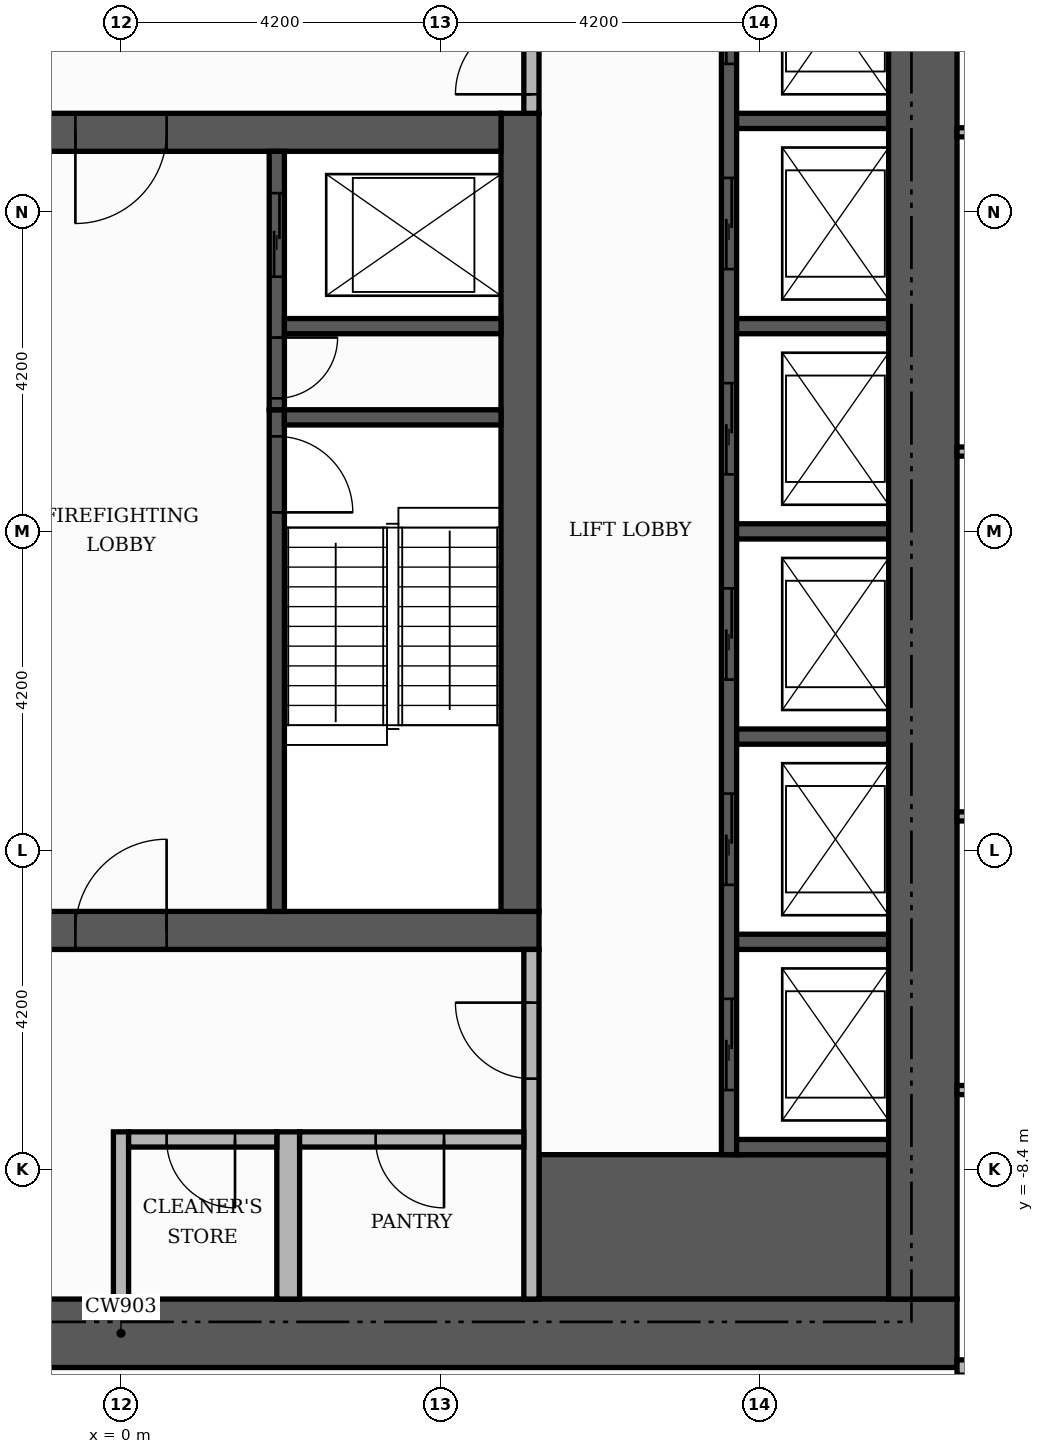
"""IFC4 building model, lengths in metres.
Left out: names, types, materials, properties, quantities, classifications, styles, units other than length and angle.
Written with IfcOpenShell. Run it as: python <this file> out.ifc"""

import sys

from ifc_helpers import new_model, si_unit, direction, frame, frame_2d, origin, place, context, subcontext, project, spatial, rectangle, extrude, element, fill, save


model = new_model("IFC4")
c1 = context("Model", 3, precision=1e-05, world=origin(), true_north=direction((0.0, 1.0)))
c2 = subcontext(c1, "Body", "Model", "MODEL_VIEW")
j1 = project(units=[si_unit("LENGTHUNIT", "METRE"), si_unit("PLANEANGLEUNIT", "RADIAN")], contexts=[c1])
p1 = place(None, origin())
s1 = spatial("IfcSite", under=j1, at=p1, CompositionType="ELEMENT")
p2 = place(p1, origin())
s2 = spatial("IfcBuilding", under=s1, at=p2, CompositionType="ELEMENT")
p3 = place(p2, frame((0.0, 0.0, 153.3)))
s3 = spatial("IfcBuildingStorey", under=s2, at=p3, CompositionType="ELEMENT", Elevation=153.3)
p4 = place(p3, frame((-5.5, -5.25, 0.0), z_axis=(0.0, 0.0, 1.0), x_axis=(1.0, 0.0, 0.0)))
e1 = element("IfcWall", 1, at=p4, inside=s3, PredefinedType="SHEAR", context=c2, shape_type="SweptSolid", body=[
    extrude(rectangle(XDim=11.0, YDim=0.5, at=frame_2d((5.5, 0.0))), origin(), (0.0, 0.0, 1.0), 3.48),
])
p5 = place(p4, frame((4.9, 0.0, 0.0)))
e2 = element("IfcOpeningElement", 2, at=p5, cuts=e1, PredefinedType="OPENING", context=c2, shape_type="SweptSolid", body=[
    extrude(rectangle(XDim=1.2, YDim=2.1, at=frame_2d((0.6, 1.05))), frame((0.0, 0.26, 0.0), z_axis=(0.0, -1.0, 0.0), x_axis=(1.0, 0.0, 0.0)), (0.0, 0.0, 1.0), 0.52),
])
p6 = place(p3, frame((5.25, -5.0, 0.0), z_axis=(0.0, 0.0, 1.0), x_axis=(0.0, 1.0, 0.0)))
e3 = element("IfcWall", 3, at=p6, inside=s3, PredefinedType="SHEAR", context=c2, shape_type="SweptSolid", body=[
    extrude(rectangle(XDim=10.5, YDim=0.5, at=frame_2d((5.25, 0.0))), origin(), (0.0, 0.0, 1.0), 3.48),
])
p7 = place(p3, frame((-5.0, 5.25, 0.0), z_axis=(0.0, 0.0, 1.0), x_axis=(1.0, 0.0, 0.0)))
e4 = element("IfcWall", 4, at=p7, inside=s3, PredefinedType="SHEAR", context=c2, shape_type="SweptSolid", body=[
    extrude(rectangle(XDim=10.0, YDim=0.5, at=frame_2d((5.0, 0.0))), origin(), (0.0, 0.0, 1.0), 3.48),
])
p8 = place(p7, frame((4.4, 0.0, 0.0)))
e5 = element("IfcOpeningElement", 5, at=p8, cuts=e4, PredefinedType="OPENING", context=c2, shape_type="SweptSolid", body=[
    extrude(rectangle(XDim=1.2, YDim=2.1, at=frame_2d((0.6, 1.05))), frame((0.0, 0.26, 0.0), z_axis=(0.0, -1.0, 0.0), x_axis=(1.0, 0.0, 0.0)), (0.0, 0.0, 1.0), 0.52),
])
p9 = place(p3, frame((5.5, -9.15, 0.0), z_axis=(0.0, 0.0, 1.0), x_axis=(1.0, 0.0, 0.0)))
e6 = element("IfcWall", 6, at=p9, inside=s3, PredefinedType="SHEAR", context=c2, shape_type="SweptSolid", body=[
    extrude(rectangle(XDim=4.6, YDim=1.9, at=frame_2d((2.3, 0.0))), origin(), (0.0, 0.0, 1.0), 3.48),
])
p10 = place(p3, frame((2.05, -5.0, 0.0), z_axis=(0.0, 0.0, 1.0), x_axis=(0.0, 1.0, 0.0)))
e7 = element("IfcWall", 7, at=p10, inside=s3, PredefinedType="SHEAR", context=c2, shape_type="SweptSolid", body=[
    extrude(rectangle(XDim=6.6, YDim=0.2, at=frame_2d((3.3, 0.0))), origin(), (0.0, 0.0, 1.0), 3.48),
])
p11 = place(p10, frame((5.25, 0.0, 0.0)))
e8 = element("IfcOpeningElement", 8, at=p11, cuts=e7, PredefinedType="OPENING", context=c2, shape_type="SweptSolid", body=[
    extrude(rectangle(XDim=1.0, YDim=2.1, at=frame_2d((0.5, 1.05))), frame((0.0, 0.11, 0.0), z_axis=(0.0, -1.0, 0.0), x_axis=(1.0, 0.0, 0.0)), (0.0, 0.0, 1.0), 0.22),
])
p12 = place(p3, frame((2.15, 1.5, 0.0), z_axis=(0.0, 0.0, 1.0), x_axis=(1.0, 0.0, 0.0)))
e9 = element("IfcWall", 9, at=p12, inside=s3, PredefinedType="SHEAR", context=c2, shape_type="SweptSolid", body=[
    extrude(rectangle(XDim=2.85, YDim=0.2, at=frame_2d((1.425, 0.0))), origin(), (0.0, 0.0, 1.0), 3.48),
])
p13 = place(p3, frame((8.0, -8.2, 0.0), z_axis=(0.0, 0.0, 1.0), x_axis=(0.0, 1.0, 0.0)))
e10 = element("IfcWall", 10, at=p13, inside=s3, PredefinedType="SHEAR", context=c2, shape_type="SweptSolid", body=[
    extrude(rectangle(XDim=16.4, YDim=0.2, at=frame_2d((8.2, 0.0))), origin(), (0.0, 0.0, 1.0), 3.48),
])
p14 = place(p13, frame((0.85, 0.0, 0.0)))
e11 = element("IfcOpeningElement", 11, at=p14, cuts=e10, PredefinedType="OPENING", context=c2, shape_type="SweptSolid", body=[
    extrude(rectangle(XDim=1.2, YDim=2.1, at=frame_2d((0.6, 1.05))), frame((0.0, 0.11, 0.0), z_axis=(0.0, -1.0, 0.0), x_axis=(1.0, 0.0, 0.0)), (0.0, 0.0, 1.0), 0.22),
])
p15 = place(p13, frame((3.55, 0.0, 0.0)))
e12 = element("IfcOpeningElement", 12, at=p15, cuts=e10, PredefinedType="OPENING", context=c2, shape_type="SweptSolid", body=[
    extrude(rectangle(XDim=1.2, YDim=2.1, at=frame_2d((0.6, 1.05))), frame((0.0, 0.11, 0.0), z_axis=(0.0, -1.0, 0.0), x_axis=(1.0, 0.0, 0.0)), (0.0, 0.0, 1.0), 0.22),
])
p16 = place(p13, frame((6.25, 0.0, 0.0)))
e13 = element("IfcOpeningElement", 13, at=p16, cuts=e10, PredefinedType="OPENING", context=c2, shape_type="SweptSolid", body=[
    extrude(rectangle(XDim=1.2, YDim=2.1, at=frame_2d((0.6, 1.05))), frame((0.0, 0.11, 0.0), z_axis=(0.0, -1.0, 0.0), x_axis=(1.0, 0.0, 0.0)), (0.0, 0.0, 1.0), 0.22),
])
p17 = place(p13, frame((8.95, 0.0, 0.0)))
e14 = element("IfcOpeningElement", 14, at=p17, cuts=e10, PredefinedType="OPENING", context=c2, shape_type="SweptSolid", body=[
    extrude(rectangle(XDim=1.2, YDim=2.1, at=frame_2d((0.6, 1.05))), frame((0.0, 0.11, 0.0), z_axis=(0.0, -1.0, 0.0), x_axis=(1.0, 0.0, 0.0)), (0.0, 0.0, 1.0), 0.22),
])
p18 = place(p13, frame((11.65, 0.0, 0.0)))
e15 = element("IfcOpeningElement", 15, at=p18, cuts=e10, PredefinedType="OPENING", context=c2, shape_type="SweptSolid", body=[
    extrude(rectangle(XDim=1.2, YDim=2.1, at=frame_2d((0.6, 1.05))), frame((0.0, 0.11, 0.0), z_axis=(0.0, -1.0, 0.0), x_axis=(1.0, 0.0, 0.0)), (0.0, 0.0, 1.0), 0.22),
])
p19 = place(p13, frame((14.35, 0.0, 0.0)))
e16 = element("IfcOpeningElement", 16, at=p19, cuts=e10, PredefinedType="OPENING", context=c2, shape_type="SweptSolid", body=[
    extrude(rectangle(XDim=1.2, YDim=2.1, at=frame_2d((0.6, 1.05))), frame((0.0, 0.11, 0.0), z_axis=(0.0, -1.0, 0.0), x_axis=(1.0, 0.0, 0.0)), (0.0, 0.0, 1.0), 0.22),
])
for number, where, z_axis, x_axis in (
    (17, (8.1, -8.1, 0.0), (0.0, 0.0, 1.0), (1.0, 0.0, 0.0)),
    (18, (8.1, -5.4, 0.0), (0.0, 0.0, 1.0), (1.0, 0.0, 0.0)),
    (19, (8.1, -2.7, 0.0), (0.0, 0.0, 1.0), (1.0, 0.0, 0.0)),
    (20, (8.1, 0.0, 0.0), (0.0, 0.0, 1.0), (1.0, 0.0, 0.0)),
):
    element("IfcWall", number, at=place(p3, frame(where, z_axis=z_axis, x_axis=x_axis)), inside=s3, PredefinedType="SHEAR", context=c2, shape_type="SweptSolid", body=[
        extrude(rectangle(XDim=2.0, YDim=0.2, at=frame_2d((1.0, 0.0))), origin(), (0.0, 0.0, 1.0), 3.48),
    ])
p20 = place(p3, frame((2.05, 1.6, 0.0), z_axis=(0.0, 0.0, 1.0), x_axis=(0.0, 1.0, 0.0)))
e21 = element("IfcWall", 21, at=p20, inside=s3, PredefinedType="SHEAR", context=c2, shape_type="SweptSolid", body=[
    extrude(rectangle(XDim=3.4, YDim=0.2, at=frame_2d((1.7, 0.0))), origin(), (0.0, 0.0, 1.0), 3.48),
])
p21 = place(p20, frame((1.75, 0.0, 0.0)))
e22 = element("IfcOpeningElement", 22, at=p21, cuts=e21, PredefinedType="OPENING", context=c2, shape_type="SweptSolid", body=[
    extrude(rectangle(XDim=1.1, YDim=2.1, at=frame_2d((0.55, 1.05))), frame((0.0, 0.11, 0.0), z_axis=(0.0, -1.0, 0.0), x_axis=(1.0, 0.0, 0.0)), (0.0, 0.0, 1.0), 0.22),
])
p22 = place(p20, frame((0.15, 0.0, 0.0)))
e23 = element("IfcOpeningElement", 23, at=p22, cuts=e21, PredefinedType="OPENING", context=c2, shape_type="SweptSolid", body=[
    extrude(rectangle(XDim=0.8, YDim=2.1, at=frame_2d((0.4, 1.05))), frame((0.0, 0.11, 0.0), z_axis=(0.0, -1.0, 0.0), x_axis=(1.0, 0.0, 0.0)), (0.0, 0.0, 1.0), 0.22),
])
p23 = place(p3, frame((2.15, 2.7, 0.0), z_axis=(0.0, 0.0, 1.0), x_axis=(1.0, 0.0, 0.0)))
e24 = element("IfcWall", 24, at=p23, inside=s3, PredefinedType="SHEAR", context=c2, shape_type="SweptSolid", body=[
    extrude(rectangle(XDim=2.85, YDim=0.2, at=frame_2d((1.425, 0.0))), origin(), (0.0, 0.0, 1.0), 3.48),
])
for number, where, z_axis, x_axis in (
    (25, (8.1, 2.7, 0.0), (0.0, 0.0, 1.0), (1.0, 0.0, 0.0)),
    (26, (8.1, 5.4, 0.0), (0.0, 0.0, 1.0), (1.0, 0.0, 0.0)),
):
    element("IfcWall", number, at=place(p3, frame(where, z_axis=z_axis, x_axis=x_axis)), inside=s3, PredefinedType="SHEAR", context=c2, shape_type="SweptSolid", body=[
        extrude(rectangle(XDim=2.0, YDim=0.2, at=frame_2d((1.0, 0.0))), origin(), (0.0, 0.0, 1.0), 3.48),
    ])
p24 = place(p3, frame((-11.0, -10.55, 0.0), z_axis=(0.0, 0.0, 1.0), x_axis=(1.0, 0.0, 0.0)))
e27 = element("IfcWall", 27, at=p24, inside=s3, PredefinedType="SHEAR", context=c2, shape_type="SweptSolid", body=[
    extrude(rectangle(XDim=22.0, YDim=0.9, at=frame_2d((11.0, 0.0))), origin(), (0.0, 0.0, 1.0), 3.48),
])
p25 = place(p24, frame((7.4, 0.0, 0.0)))
e28 = element("IfcOpeningElement", 28, at=p25, cuts=e27, PredefinedType="OPENING", context=c2, shape_type="SweptSolid", body=[
    extrude(rectangle(XDim=1.8, YDim=2.2, at=frame_2d((0.9, 1.1))), frame((0.0, 0.46, 0.0), z_axis=(0.0, -1.0, 0.0), x_axis=(1.0, 0.0, 0.0)), (0.0, 0.0, 1.0), 0.92),
])
p26 = place(p3, frame((10.55, -10.1, 0.0), z_axis=(0.0, 0.0, 1.0), x_axis=(0.0, 1.0, 0.0)))
e29 = element("IfcWall", 29, at=p26, inside=s3, PredefinedType="SHEAR", context=c2, shape_type="SweptSolid", body=[
    extrude(rectangle(XDim=20.2, YDim=0.9, at=frame_2d((10.1, 0.0))), origin(), (0.0, 0.0, 1.0), 3.48),
])
p27 = place(p3, frame((0.0, -10.1, 0.0), z_axis=(0.0, 0.0, 1.0), x_axis=(0.0, 1.0, 0.0)))
e30 = element("IfcWall", 30, at=p27, inside=s3, PredefinedType="PARTITIONING", context=c2, shape_type="SweptSolid", body=[
    extrude(rectangle(XDim=2.2, YDim=0.2, at=frame_2d((1.1, 0.0))), origin(), (0.0, 0.0, 1.0), 3.48),
])
p28 = place(p3, frame((2.2, -10.1, 0.0), z_axis=(0.0, 0.0, 1.0), x_axis=(0.0, 1.0, 0.0)))
e31 = element("IfcWall", 31, at=p28, inside=s3, PredefinedType="PARTITIONING", context=c2, shape_type="SweptSolid", body=[
    extrude(rectangle(XDim=2.2, YDim=0.3, at=frame_2d((1.1, 0.0))), origin(), (0.0, 0.0, 1.0), 3.48),
])
p29 = place(p3, frame((5.4, -10.1, 0.0), z_axis=(0.0, 0.0, 1.0), x_axis=(0.0, 1.0, 0.0)))
e32 = element("IfcWall", 32, at=p29, inside=s3, PredefinedType="PARTITIONING", context=c2, shape_type="SweptSolid", body=[
    extrude(rectangle(XDim=4.6, YDim=0.2, at=frame_2d((2.3, 0.0))), origin(), (0.0, 0.0, 1.0), 3.48),
])
p30 = place(p29, frame((2.9, 0.0, 0.0)))
e33 = element("IfcOpeningElement", 33, at=p30, cuts=e32, PredefinedType="OPENING", context=c2, shape_type="SweptSolid", body=[
    extrude(rectangle(XDim=1.0, YDim=2.1, at=frame_2d((0.5, 1.05))), frame((0.0, 0.11, 0.0), z_axis=(0.0, -1.0, 0.0), x_axis=(1.0, 0.0, 0.0)), (0.0, 0.0, 1.0), 0.22),
])
p31 = place(p3, frame((0.1, -8.0, 0.0), z_axis=(0.0, 0.0, 1.0), x_axis=(1.0, 0.0, 0.0)))
e34 = element("IfcWall", 34, at=p31, inside=s3, PredefinedType="PARTITIONING", context=c2, shape_type="SweptSolid", body=[
    extrude(rectangle(XDim=1.95, YDim=0.2, at=frame_2d((0.975, 0.0))), origin(), (0.0, 0.0, 1.0), 3.48),
])
p32 = place(p31, frame((0.5, 0.0, 0.0)))
e35 = element("IfcOpeningElement", 35, at=p32, cuts=e34, PredefinedType="OPENING", context=c2, shape_type="SweptSolid", body=[
    extrude(rectangle(XDim=0.9, YDim=2.1, at=frame_2d((0.45, 1.05))), frame((0.0, 0.11, 0.0), z_axis=(0.0, -1.0, 0.0), x_axis=(1.0, 0.0, 0.0)), (0.0, 0.0, 1.0), 0.22),
])
p33 = place(p3, frame((2.35, -8.0, 0.0), z_axis=(0.0, 0.0, 1.0), x_axis=(1.0, 0.0, 0.0)))
e36 = element("IfcWall", 36, at=p33, inside=s3, PredefinedType="PARTITIONING", context=c2, shape_type="SweptSolid", body=[
    extrude(rectangle(XDim=2.95, YDim=0.2, at=frame_2d((1.475, 0.0))), origin(), (0.0, 0.0, 1.0), 3.48),
])
p34 = place(p33, frame((1.0, 0.0, 0.0)))
e37 = element("IfcOpeningElement", 37, at=p34, cuts=e36, PredefinedType="OPENING", context=c2, shape_type="SweptSolid", body=[
    extrude(rectangle(XDim=0.9, YDim=2.1, at=frame_2d((0.45, 1.05))), frame((0.0, 0.11, 0.0), z_axis=(0.0, -1.0, 0.0), x_axis=(1.0, 0.0, 0.0)), (0.0, 0.0, 1.0), 0.22),
])
p35 = place(p3, frame((5.4, 5.5, 0.0), z_axis=(0.0, 0.0, 1.0), x_axis=(0.0, 1.0, 0.0)))
e38 = element("IfcWall", 38, at=p35, inside=s3, PredefinedType="PARTITIONING", context=c2, shape_type="SweptSolid", body=[
    extrude(rectangle(XDim=4.6, YDim=0.2, at=frame_2d((2.3, 0.0))), origin(), (0.0, 0.0, 1.0), 3.48),
])
p36 = place(p35, frame((0.25, 0.0, 0.0)))
e39 = element("IfcOpeningElement", 39, at=p36, cuts=e38, PredefinedType="OPENING", context=c2, shape_type="SweptSolid", body=[
    extrude(rectangle(XDim=1.0, YDim=2.1, at=frame_2d((0.5, 1.05))), frame((0.0, 0.11, 0.0), z_axis=(0.0, -1.0, 0.0), x_axis=(1.0, 0.0, 0.0)), (0.0, 0.0, 1.0), 0.22),
])
p37 = place(p3, frame((11.0, -11.0, 0.0), z_axis=(0.0, 0.0, 1.0), x_axis=(1.0, 0.0, 0.0)))
e40 = element("IfcWall", 40, at=p37, inside=s3, PredefinedType="PARTITIONING", context=c2, shape_type="SweptSolid", body=[
    extrude(rectangle(XDim=2.65, YDim=0.2, at=frame_2d((1.325, 0.0))), origin(), (0.0, 0.0, 1.0), 3.48),
])
p38 = place(p37, frame((0.775, 0.0, 0.0)))
e41 = element("IfcOpeningElement", 41, at=p38, cuts=e40, PredefinedType="OPENING", context=c2, shape_type="SweptSolid", body=[
    extrude(rectangle(XDim=1.1, YDim=2.4, at=frame_2d((0.55, 1.2))), frame((0.0, 0.11, 0.0), z_axis=(0.0, -1.0, 0.0), x_axis=(1.0, 0.0, 0.0)), (0.0, 0.0, 1.0), 0.22),
])
p39 = place(p3, frame((11.0, -7.35, 0.0), z_axis=(0.0, 0.0, 1.0), x_axis=(1.0, 0.0, 0.0)))
e42 = element("IfcWall", 42, at=p39, inside=s3, PredefinedType="PARTITIONING", context=c2, shape_type="SweptSolid", body=[
    extrude(rectangle(XDim=7.32, YDim=0.12, at=frame_2d((3.66, 0.0))), origin(), (0.0, 0.0, 1.0), 3.48),
])
p40 = place(p39, frame((3.21, 0.0, 0.0)))
e43 = element("IfcOpeningElement", 43, at=p40, cuts=e42, PredefinedType="OPENING", context=c2, shape_type="SweptSolid", body=[
    extrude(rectangle(XDim=0.9, YDim=2.1, at=frame_2d((0.45, 1.05))), frame((0.0, 0.07, 0.0), z_axis=(0.0, -1.0, 0.0), x_axis=(1.0, 0.0, 0.0)), (0.0, 0.0, 1.0), 0.14),
])
for number, where, z_axis, x_axis in (
    (44, (11.0, -3.75, 0.0), (0.0, 0.0, 1.0), (1.0, 0.0, 0.0)),
    (45, (11.0, 1.05, 0.0), (0.0, 0.0, 1.0), (1.0, 0.0, 0.0)),
    (46, (11.0, 5.25, 0.0), (0.0, 0.0, 1.0), (1.0, 0.0, 0.0)),
):
    element("IfcWall", number, at=place(p3, frame(where, z_axis=z_axis, x_axis=x_axis)), inside=s3, PredefinedType="PARTITIONING", context=c2, shape_type="SweptSolid", body=[
        extrude(rectangle(XDim=7.32, YDim=0.12, at=frame_2d((3.66, 0.0))), origin(), (0.0, 0.0, 1.0), 3.48),
    ])
p41 = place(p14, origin())
e47 = element("IfcDoor", 47, at=p41, inside=s3, OperationType="SLIDING_TO_LEFT", PredefinedType="DOOR", context=c2, shape_type="SweptSolid", body=[
    extrude(rectangle(XDim=1.2, YDim=2.1, at=frame_2d((0.6, 1.05))), frame((0.0, 0.025, 0.0), z_axis=(0.0, -1.0, 0.0), x_axis=(1.0, 0.0, 0.0)), (0.0, 0.0, 1.0), 0.05),
])
fill(e11, e47)
p42 = place(p15, origin())
e48 = element("IfcDoor", 48, at=p42, inside=s3, OperationType="SLIDING_TO_LEFT", PredefinedType="DOOR", context=c2, shape_type="SweptSolid", body=[
    extrude(rectangle(XDim=1.2, YDim=2.1, at=frame_2d((0.6, 1.05))), frame((0.0, 0.025, 0.0), z_axis=(0.0, -1.0, 0.0), x_axis=(1.0, 0.0, 0.0)), (0.0, 0.0, 1.0), 0.05),
])
fill(e12, e48)
p43 = place(p16, origin())
e49 = element("IfcDoor", 49, at=p43, inside=s3, OperationType="SLIDING_TO_LEFT", PredefinedType="DOOR", context=c2, shape_type="SweptSolid", body=[
    extrude(rectangle(XDim=1.2, YDim=2.1, at=frame_2d((0.6, 1.05))), frame((0.0, 0.025, 0.0), z_axis=(0.0, -1.0, 0.0), x_axis=(1.0, 0.0, 0.0)), (0.0, 0.0, 1.0), 0.05),
])
fill(e13, e49)
p44 = place(p17, origin())
e50 = element("IfcDoor", 50, at=p44, inside=s3, OperationType="SLIDING_TO_LEFT", PredefinedType="DOOR", context=c2, shape_type="SweptSolid", body=[
    extrude(rectangle(XDim=1.2, YDim=2.1, at=frame_2d((0.6, 1.05))), frame((0.0, 0.025, 0.0), z_axis=(0.0, -1.0, 0.0), x_axis=(1.0, 0.0, 0.0)), (0.0, 0.0, 1.0), 0.05),
])
fill(e14, e50)
p45 = place(p18, origin())
e51 = element("IfcDoor", 51, at=p45, inside=s3, OperationType="SLIDING_TO_LEFT", PredefinedType="DOOR", context=c2, shape_type="SweptSolid", body=[
    extrude(rectangle(XDim=1.2, YDim=2.1, at=frame_2d((0.6, 1.05))), frame((0.0, 0.025, 0.0), z_axis=(0.0, -1.0, 0.0), x_axis=(1.0, 0.0, 0.0)), (0.0, 0.0, 1.0), 0.05),
])
fill(e15, e51)
p46 = place(p19, origin())
e52 = element("IfcDoor", 52, at=p46, inside=s3, OperationType="SLIDING_TO_LEFT", PredefinedType="DOOR", context=c2, shape_type="SweptSolid", body=[
    extrude(rectangle(XDim=1.2, YDim=2.1, at=frame_2d((0.6, 1.05))), frame((0.0, 0.025, 0.0), z_axis=(0.0, -1.0, 0.0), x_axis=(1.0, 0.0, 0.0)), (0.0, 0.0, 1.0), 0.05),
])
fill(e16, e52)
p47 = place(p21, origin())
e53 = element("IfcDoor", 53, at=p47, inside=s3, OperationType="SLIDING_TO_LEFT", PredefinedType="DOOR", context=c2, shape_type="SweptSolid", body=[
    extrude(rectangle(XDim=1.1, YDim=2.1, at=frame_2d((0.55, 1.05))), frame((0.0, 0.025, 0.0), z_axis=(0.0, -1.0, 0.0), x_axis=(1.0, 0.0, 0.0)), (0.0, 0.0, 1.0), 0.05),
])
fill(e22, e53)
p48 = place(p11, frame((1.0, 0.0, 0.0), z_axis=(0.0, 0.0, 1.0), x_axis=(-1.0, 0.0, 0.0)))
e54 = element("IfcDoor", 54, at=p48, inside=s3, OperationType="SINGLE_SWING_LEFT", PredefinedType="DOOR", context=c2, shape_type="SweptSolid", body=[
    extrude(rectangle(XDim=1.0, YDim=2.1, at=frame_2d((0.5, 1.05))), frame((0.0, 0.025, 0.0), z_axis=(0.0, -1.0, 0.0), x_axis=(1.0, 0.0, 0.0)), (0.0, 0.0, 1.0), 0.05),
])
fill(e8, e54)
p49 = place(p22, frame((0.8, 0.0, 0.0), z_axis=(0.0, 0.0, 1.0), x_axis=(-1.0, 0.0, 0.0)))
e55 = element("IfcDoor", 55, at=p49, inside=s3, OperationType="SINGLE_SWING_RIGHT", PredefinedType="DOOR", context=c2, shape_type="SweptSolid", body=[
    extrude(rectangle(XDim=0.8, YDim=2.1, at=frame_2d((0.4, 1.05))), frame((0.0, 0.025, 0.0), z_axis=(0.0, -1.0, 0.0), x_axis=(1.0, 0.0, 0.0)), (0.0, 0.0, 1.0), 0.05),
])
fill(e23, e55)
p50 = place(p8, frame((1.2, 0.0, 0.0), z_axis=(0.0, 0.0, 1.0), x_axis=(-1.0, 0.0, 0.0)))
e56 = element("IfcDoor", 56, at=p50, inside=s3, OperationType="SINGLE_SWING_LEFT", PredefinedType="DOOR", context=c2, shape_type="SweptSolid", body=[
    extrude(rectangle(XDim=1.2, YDim=2.1, at=frame_2d((0.6, 1.05))), frame((0.0, 0.025, 0.0), z_axis=(0.0, -1.0, 0.0), x_axis=(1.0, 0.0, 0.0)), (0.0, 0.0, 1.0), 0.05),
])
fill(e5, e56)
p51 = place(p5, origin())
e57 = element("IfcDoor", 57, at=p51, inside=s3, OperationType="SINGLE_SWING_RIGHT", PredefinedType="DOOR", context=c2, shape_type="SweptSolid", body=[
    extrude(rectangle(XDim=1.2, YDim=2.1, at=frame_2d((0.6, 1.05))), frame((0.0, 0.025, 0.0), z_axis=(0.0, -1.0, 0.0), x_axis=(1.0, 0.0, 0.0)), (0.0, 0.0, 1.0), 0.05),
])
fill(e2, e57)
p52 = place(p36, origin())
e58 = element("IfcDoor", 58, at=p52, inside=s3, OperationType="SINGLE_SWING_LEFT", PredefinedType="DOOR", context=c2, shape_type="SweptSolid", body=[
    extrude(rectangle(XDim=1.0, YDim=2.1, at=frame_2d((0.5, 1.05))), frame((0.0, 0.025, 0.0), z_axis=(0.0, -1.0, 0.0), x_axis=(1.0, 0.0, 0.0)), (0.0, 0.0, 1.0), 0.05),
])
fill(e39, e58)
p53 = place(p30, origin())
e59 = element("IfcDoor", 59, at=p53, inside=s3, OperationType="SINGLE_SWING_RIGHT", PredefinedType="DOOR", context=c2, shape_type="SweptSolid", body=[
    extrude(rectangle(XDim=1.0, YDim=2.1, at=frame_2d((0.5, 1.05))), frame((0.0, 0.025, 0.0), z_axis=(0.0, -1.0, 0.0), x_axis=(1.0, 0.0, 0.0)), (0.0, 0.0, 1.0), 0.05),
])
fill(e33, e59)
p54 = place(p32, frame((0.9, 0.0, 0.0), z_axis=(0.0, 0.0, 1.0), x_axis=(-1.0, 0.0, 0.0)))
e60 = element("IfcDoor", 60, at=p54, inside=s3, OperationType="SINGLE_SWING_RIGHT", PredefinedType="DOOR", context=c2, shape_type="SweptSolid", body=[
    extrude(rectangle(XDim=0.9, YDim=2.1, at=frame_2d((0.45, 1.05))), frame((0.0, 0.025, 0.0), z_axis=(0.0, -1.0, 0.0), x_axis=(1.0, 0.0, 0.0)), (0.0, 0.0, 1.0), 0.05),
])
fill(e35, e60)
p55 = place(p34, frame((0.9, 0.0, 0.0), z_axis=(0.0, 0.0, 1.0), x_axis=(-1.0, 0.0, 0.0)))
e61 = element("IfcDoor", 61, at=p55, inside=s3, OperationType="SINGLE_SWING_RIGHT", PredefinedType="DOOR", context=c2, shape_type="SweptSolid", body=[
    extrude(rectangle(XDim=0.9, YDim=2.1, at=frame_2d((0.45, 1.05))), frame((0.0, 0.025, 0.0), z_axis=(0.0, -1.0, 0.0), x_axis=(1.0, 0.0, 0.0)), (0.0, 0.0, 1.0), 0.05),
])
fill(e37, e61)
save(model, sys.argv[1])
